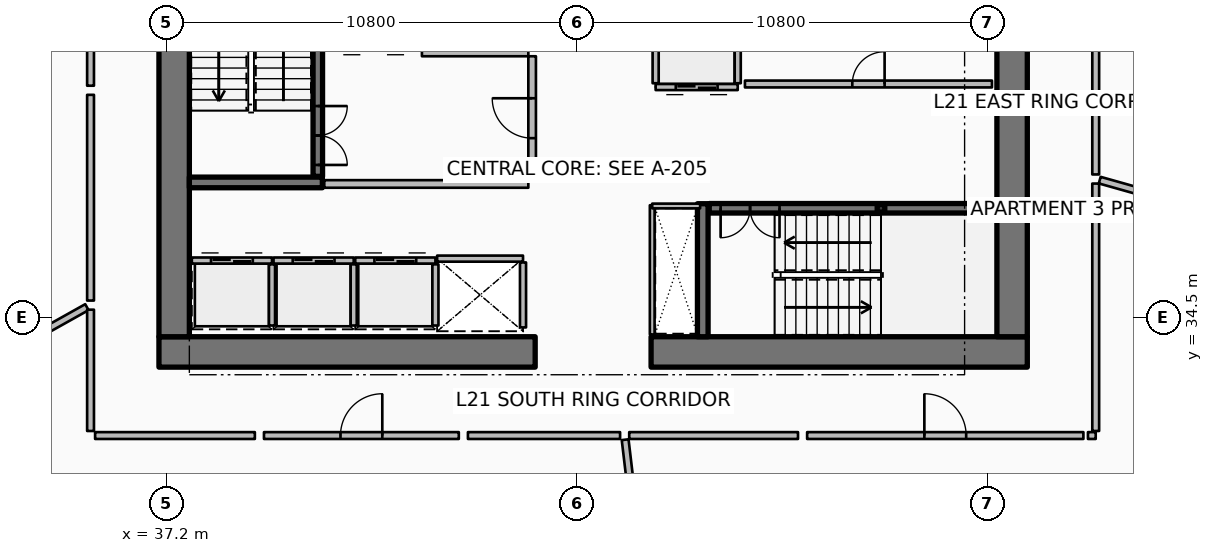
"""IFC4 building model, lengths in metres.
Left out: names, types, materials, properties, quantities, classifications, styles, units other than length and angle.
Written with IfcOpenShell. Run it as: python <this file> out.ifc"""

import sys

from ifc_helpers import new_model, si_unit, direction, frame, frame_2d, origin, origin_2d, place, context, subcontext, project, spatial, rectangle, hollow_rectangle, extrude, element, fill, save


model = new_model("IFC4")
c1 = context("Model", 3, precision=1e-05, world=origin(), true_north=direction((0.0, 1.0)))
c2 = subcontext(c1, "Body", "Model", "MODEL_VIEW")
j1 = project(units=[si_unit("LENGTHUNIT", "METRE"), si_unit("PLANEANGLEUNIT", "RADIAN")], contexts=[c1])
p1 = place(None, origin())
s1 = spatial("IfcSite", under=j1, at=p1, CompositionType="ELEMENT")
p2 = place(p1, origin())
s2 = spatial("IfcBuilding", under=s1, at=p2, CompositionType="ELEMENT")
p3 = place(p2, frame((0.0, 0.0, 86.4)))
s3 = spatial("IfcBuildingStorey", under=s2, at=p3, CompositionType="ELEMENT", Elevation=86.4)
p4 = place(p3, frame((37.0, 33.6, 0.0), z_axis=(0.0, 0.0, 1.0), x_axis=(1.0, 0.0, 0.0)))
e1 = element("IfcWall", 1, at=p4, inside=s3, PredefinedType="SHEAR", context=c2, shape_type="SweptSolid", body=[
    extrude(rectangle(XDim=9.9, YDim=0.8, at=frame_2d((4.95, 0.0))), origin(), (0.0, 0.0, 1.0), 3.75),
])
p5 = place(p3, frame((49.95, 33.6, 0.0), z_axis=(0.0, 0.0, 1.0), x_axis=(1.0, 0.0, 0.0)))
e2 = element("IfcWall", 2, at=p5, inside=s3, PredefinedType="SHEAR", context=c2, shape_type="SweptSolid", body=[
    extrude(rectangle(XDim=9.9, YDim=0.8, at=frame_2d((4.95, 0.0))), origin(), (0.0, 0.0, 1.0), 3.75),
])
for number, where, z_axis, x_axis in (
    (3, (37.4, 34.0, 0.0), (0.0, 0.0, 1.0), (0.0, 1.0, 0.0)),
    (4, (59.45, 34.0, 0.0), (0.0, 0.0, 1.0), (0.0, 1.0, 0.0)),
):
    element("IfcWall", number, at=place(p3, frame(where, z_axis=z_axis, x_axis=x_axis)), inside=s3, PredefinedType="SHEAR", context=c2, shape_type="SweptSolid", body=[
        extrude(rectangle(XDim=16.0, YDim=0.8, at=frame_2d((8.0, 0.0))), origin(), (0.0, 0.0, 1.0), 3.75),
    ])
for number, where, z_axis, x_axis in (
    (5, (37.8, 38.06, 0.0), (0.0, 0.0, 1.0), (1.0, 0.0, 0.0)),
    (6, (51.31, 34.0, 0.0), (0.0, 0.0, 1.0), (0.0, 1.0, 0.0)),
):
    element("IfcWall", number, at=place(p3, frame(where, z_axis=z_axis, x_axis=x_axis)), inside=s3, PredefinedType="SHEAR", context=c2, shape_type="SweptSolid", body=[
        extrude(rectangle(XDim=3.5, YDim=0.28, at=frame_2d((1.75, 0.0))), origin(), (0.0, 0.0, 1.0), 3.75),
    ])
p6 = place(p3, frame((56.0, 37.38, 0.0), z_axis=(0.0, 0.0, 1.0), x_axis=(1.0, 0.0, 0.0)))
e7 = element("IfcColumn", 7, at=p6, inside=s3, PredefinedType="COLUMN", context=c2, shape_type="SweptSolid", body=[
    extrude(hollow_rectangle(XDim=0.2, YDim=0.2, WallThickness=0.01, InnerFilletRadius=0.01, OuterFilletRadius=0.02, at=origin_2d()), origin(), (0.0, 0.0, 1.0), 1.67),
])
p7 = place(p3, frame((41.18, 38.22, 0.0), z_axis=(0.0, 0.0, 1.0), x_axis=(0.0, 1.0, 0.0)))
e8 = element("IfcWall", 8, at=p7, inside=s3, PredefinedType="SOLIDWALL", context=c2, shape_type="SweptSolid", body=[
    extrude(rectangle(XDim=7.56, YDim=0.25, at=frame_2d((3.78, 0.0))), origin(), (0.0, 0.0, 1.0), 3.5),
])
p8 = place(p7, frame((0.3, 0.0, 0.0)))
e9 = element("IfcOpeningElement", 9, at=p8, cuts=e8, PredefinedType="OPENING", context=c2, shape_type="SweptSolid", body=[
    extrude(rectangle(XDim=1.55, YDim=2.15, at=frame_2d((0.775, 1.075))), frame((0.0, 0.135, 0.0), z_axis=(0.0, -1.0, 0.0), x_axis=(1.0, 0.0, 0.0)), (0.0, 0.0, 1.0), 0.27),
])
p9 = place(p3, frame((51.48, 37.38, 0.0), z_axis=(0.0, 0.0, 1.0), x_axis=(1.0, 0.0, 0.0)))
e10 = element("IfcWall", 10, at=p9, inside=s3, PredefinedType="SOLIDWALL", context=c2, shape_type="SweptSolid", body=[
    extrude(rectangle(XDim=7.54, YDim=0.25, at=frame_2d((3.77, 0.0))), origin(), (0.0, 0.0, 1.0), 3.5),
])
p10 = place(p9, frame((0.3, 0.0, 0.0)))
e11 = element("IfcOpeningElement", 11, at=p10, cuts=e10, PredefinedType="OPENING", context=c2, shape_type="SweptSolid", body=[
    extrude(rectangle(XDim=1.55, YDim=2.15, at=frame_2d((0.775, 1.075))), frame((0.0, 0.135, 0.0), z_axis=(0.0, -1.0, 0.0), x_axis=(1.0, 0.0, 0.0)), (0.0, 0.0, 1.0), 0.27),
])
p11 = place(p3, frame((37.865, 36.005, 0.0), z_axis=(0.0, 0.0, 1.0), x_axis=(1.0, 0.0, 0.0)))
e12 = element("IfcWall", 12, at=p11, inside=s3, PredefinedType="PARTITIONING", context=c2, shape_type="SweptSolid", body=[
    extrude(rectangle(XDim=2.11, YDim=0.16, at=frame_2d((1.055, 0.0))), origin(), (0.0, 0.0, 1.0), 3.5),
])
p12 = place(p11, frame((0.505, 0.0, 0.0)))
e13 = element("IfcOpeningElement", 13, at=p12, cuts=e12, PredefinedType="OPENING", context=c2, shape_type="SweptSolid", body=[
    extrude(rectangle(XDim=1.1, YDim=2.1, at=frame_2d((0.55, 1.05))), frame((0.0, 0.09, 0.0), z_axis=(0.0, -1.0, 0.0), x_axis=(1.0, 0.0, 0.0)), (0.0, 0.0, 1.0), 0.18),
])
p13 = place(p3, frame((39.975, 34.295, 0.0), z_axis=(0.0, 0.0, 1.0), x_axis=(0.0, 1.0, 0.0)))
e14 = element("IfcWall", 14, at=p13, inside=s3, PredefinedType="PARTITIONING", context=c2, shape_type="SweptSolid", body=[
    extrude(rectangle(XDim=1.61, YDim=0.16, at=frame_2d((0.805, 0.0))), origin(), (0.0, 0.0, 1.0), 3.5),
])
p14 = place(p3, frame((40.015, 36.005, 0.0), z_axis=(0.0, 0.0, 1.0), x_axis=(1.0, 0.0, 0.0)))
e15 = element("IfcWall", 15, at=p14, inside=s3, PredefinedType="PARTITIONING", context=c2, shape_type="SweptSolid", body=[
    extrude(rectangle(XDim=2.11, YDim=0.16, at=frame_2d((1.055, 0.0))), origin(), (0.0, 0.0, 1.0), 3.5),
])
p15 = place(p14, frame((0.505, 0.0, 0.0)))
e16 = element("IfcOpeningElement", 16, at=p15, cuts=e15, PredefinedType="OPENING", context=c2, shape_type="SweptSolid", body=[
    extrude(rectangle(XDim=1.1, YDim=2.1, at=frame_2d((0.55, 1.05))), frame((0.0, 0.09, 0.0), z_axis=(0.0, -1.0, 0.0), x_axis=(1.0, 0.0, 0.0)), (0.0, 0.0, 1.0), 0.18),
])
p16 = place(p3, frame((42.125, 34.295, 0.0), z_axis=(0.0, 0.0, 1.0), x_axis=(0.0, 1.0, 0.0)))
e17 = element("IfcWall", 17, at=p16, inside=s3, PredefinedType="PARTITIONING", context=c2, shape_type="SweptSolid", body=[
    extrude(rectangle(XDim=1.61, YDim=0.16, at=frame_2d((0.805, 0.0))), origin(), (0.0, 0.0, 1.0), 3.5),
])
p17 = place(p3, frame((42.165, 36.005, 0.0), z_axis=(0.0, 0.0, 1.0), x_axis=(1.0, 0.0, 0.0)))
e18 = element("IfcWall", 18, at=p17, inside=s3, PredefinedType="PARTITIONING", context=c2, shape_type="SweptSolid", body=[
    extrude(rectangle(XDim=2.11, YDim=0.16, at=frame_2d((1.055, 0.0))), origin(), (0.0, 0.0, 1.0), 3.5),
])
p18 = place(p17, frame((0.505, 0.0, 0.0)))
e19 = element("IfcOpeningElement", 19, at=p18, cuts=e18, PredefinedType="OPENING", context=c2, shape_type="SweptSolid", body=[
    extrude(rectangle(XDim=1.1, YDim=2.1, at=frame_2d((0.55, 1.05))), frame((0.0, 0.09, 0.0), z_axis=(0.0, -1.0, 0.0), x_axis=(1.0, 0.0, 0.0)), (0.0, 0.0, 1.0), 0.18),
])
p19 = place(p3, frame((44.275, 34.295, 0.0), z_axis=(0.0, 0.0, 1.0), x_axis=(0.0, 1.0, 0.0)))
e20 = element("IfcWall", 20, at=p19, inside=s3, PredefinedType="PARTITIONING", context=c2, shape_type="SweptSolid", body=[
    extrude(rectangle(XDim=1.61, YDim=0.16, at=frame_2d((0.805, 0.0))), origin(), (0.0, 0.0, 1.0), 3.5),
])
p20 = place(p3, frame((44.32, 36.055, 0.0), z_axis=(0.0, 0.0, 1.0), x_axis=(1.0, 0.0, 0.0)))
e21 = element("IfcWall", 21, at=p20, inside=s3, PredefinedType="PARTITIONING", context=c2, shape_type="SweptSolid", body=[
    extrude(rectangle(XDim=2.26, YDim=0.16, at=frame_2d((1.13, 0.0))), origin(), (0.0, 0.0, 1.0), 3.5),
])
p21 = place(p3, frame((46.58, 34.245, 0.0), z_axis=(0.0, 0.0, 1.0), x_axis=(0.0, 1.0, 0.0)))
e22 = element("IfcWall", 22, at=p21, inside=s3, PredefinedType="PARTITIONING", context=c2, shape_type="SweptSolid", body=[
    extrude(rectangle(XDim=1.71, YDim=0.16, at=frame_2d((0.855, 0.0))), origin(), (0.0, 0.0, 1.0), 3.5),
])
p22 = place(p3, frame((52.23, 40.57, 0.0), z_axis=(0.0, 0.0, 1.0), x_axis=(-1.0, 0.0, 0.0)))
e23 = element("IfcWall", 23, at=p22, inside=s3, PredefinedType="PARTITIONING", context=c2, shape_type="SweptSolid", body=[
    extrude(rectangle(XDim=2.16, YDim=0.16, at=frame_2d((1.08, 0.0))), origin(), (0.0, 0.0, 1.0), 3.5),
])
p23 = place(p22, frame((0.53, 0.0, 0.0)))
e24 = element("IfcOpeningElement", 24, at=p23, cuts=e23, PredefinedType="OPENING", context=c2, shape_type="SweptSolid", body=[
    extrude(rectangle(XDim=1.1, YDim=2.1, at=frame_2d((0.55, 1.05))), frame((0.0, 0.09, 0.0), z_axis=(0.0, -1.0, 0.0), x_axis=(1.0, 0.0, 0.0)), (0.0, 0.0, 1.0), 0.18),
])
for number, where, z_axis, x_axis in (
    (25, (52.23, 40.67, 0.0), (0.0, 0.0, 1.0), (0.0, 1.0, 0.0)),
    (26, (50.07, 40.67, 0.0), (0.0, 0.0, 1.0), (0.0, 1.0, 0.0)),
):
    element("IfcWall", number, at=place(p3, frame(where, z_axis=z_axis, x_axis=x_axis)), inside=s3, PredefinedType="PARTITIONING", context=c2, shape_type="SweptSolid", body=[
        extrude(rectangle(XDim=2.16, YDim=0.16, at=frame_2d((1.08, 0.0))), origin(), (0.0, 0.0, 1.0), 3.5),
    ])
p24 = place(p3, frame((52.42, 40.65, 0.0), z_axis=(0.0, 0.0, 1.0), x_axis=(1.0, 0.0, 0.0)))
e27 = element("IfcWall", 27, at=p24, inside=s3, PredefinedType="PARTITIONING", context=c2, shape_type="SweptSolid", body=[
    extrude(rectangle(XDim=6.5, YDim=0.18, at=frame_2d((3.25, 0.0))), origin(), (0.0, 0.0, 1.0), 3.5),
])
p25 = place(p24, frame((2.825, 0.0, 0.0)))
e28 = element("IfcOpeningElement", 28, at=p25, cuts=e27, PredefinedType="OPENING", context=c2, shape_type="SweptSolid", body=[
    extrude(rectangle(XDim=0.85, YDim=2.06, at=frame_2d((0.425, 1.03))), frame((0.0, 0.1, 0.0), z_axis=(0.0, -1.0, 0.0), x_axis=(1.0, 0.0, 0.0)), (0.0, 0.0, 1.0), 0.2),
])
p26 = place(p3, frame((41.35, 38.02, 0.0), z_axis=(0.0, 0.0, 1.0), x_axis=(1.0, 0.0, 0.0)))
e29 = element("IfcWall", 29, at=p26, inside=s3, PredefinedType="PARTITIONING", context=c2, shape_type="SweptSolid", body=[
    extrude(rectangle(XDim=5.37, YDim=0.2, at=frame_2d((2.685, 0.0))), origin(), (0.0, 0.0, 1.0), 3.5),
])
p27 = place(p3, frame((43.92, 41.48, 0.0), z_axis=(0.0, 0.0, 1.0), x_axis=(1.0, 0.0, 0.0)))
e30 = element("IfcWall", 30, at=p27, inside=s3, PredefinedType="PARTITIONING", context=c2, shape_type="SweptSolid", body=[
    extrude(rectangle(XDim=2.8, YDim=0.2, at=frame_2d((1.4, 0.0))), origin(), (0.0, 0.0, 1.0), 3.5),
])
p28 = place(p3, frame((46.82, 38.12, 0.0), z_axis=(0.0, 0.0, 1.0), x_axis=(0.0, 1.0, 0.0)))
e31 = element("IfcWall", 31, at=p28, inside=s3, PredefinedType="PARTITIONING", context=c2, shape_type="SweptSolid", body=[
    extrude(rectangle(XDim=3.26, YDim=0.2, at=frame_2d((1.63, 0.0))), origin(), (0.0, 0.0, 1.0), 3.5),
])
p29 = place(p28, frame((1.105, 0.0, 0.0)))
e32 = element("IfcOpeningElement", 32, at=p29, cuts=e31, PredefinedType="OPENING", context=c2, shape_type="SweptSolid", body=[
    extrude(rectangle(XDim=1.05, YDim=2.1, at=frame_2d((0.525, 1.05))), frame((0.0, 0.11, 0.0), z_axis=(0.0, -1.0, 0.0), x_axis=(1.0, 0.0, 0.0)), (0.0, 0.0, 1.0), 0.22),
])
p30 = place(p3, frame((49.98, 34.06, 0.0), z_axis=(0.0, 0.0, 1.0), x_axis=(0.0, 1.0, 0.0)))
e33 = element("IfcWall", 33, at=p30, inside=s3, PredefinedType="PARTITIONING", context=c2, shape_type="SweptSolid", body=[
    extrude(rectangle(XDim=3.4, YDim=0.125, at=frame_2d((1.7, 0.0))), origin(), (0.0, 0.0, 1.0), 2.94),
])
p31 = place(p3, frame((49.98, 37.44, 0.0), z_axis=(0.0, 0.0, 1.0), x_axis=(1.0, 0.0, 0.0)))
e34 = element("IfcWall", 34, at=p31, inside=s3, PredefinedType="PARTITIONING", context=c2, shape_type="SweptSolid", body=[
    extrude(rectangle(XDim=1.26, YDim=0.125, at=frame_2d((0.63, 0.0))), origin(), (0.0, 0.0, 1.0), 2.94),
])
p32 = place(p3, frame((35.104, 34.778, 0.0), z_axis=(0.0, 0.0, 1.0), x_axis=(-0.872490437896, -0.488631185845, 0.0)))
e35 = element("IfcWall", 35, at=p32, inside=s3, PredefinedType="PARTITIONING", context=c2, shape_type="SweptSolid", body=[
    extrude(rectangle(XDim=14.699, YDim=0.18, at=frame_2d((7.35, 0.0))), origin(), (0.0, 0.0, 1.0), 2.94),
])
p33 = place(p3, frame((49.268, 31.291, 0.0), z_axis=(0.0, 0.0, 1.0), x_axis=(0.117532311618, -0.993069058891, 0.0)))
e36 = element("IfcWall", 36, at=p33, inside=s3, PredefinedType="PARTITIONING", context=c2, shape_type="SweptSolid", body=[
    extrude(rectangle(XDim=13.138, YDim=0.18, at=frame_2d((6.569, 0.0))), origin(), (0.0, 0.0, 1.0), 2.94),
])
p34 = place(p3, frame((61.756, 38.12, 0.0), z_axis=(0.0, 0.0, 1.0), x_axis=(0.962455861176, -0.271438234756, 0.0)))
e37 = element("IfcWall", 37, at=p34, inside=s3, PredefinedType="PARTITIONING", context=c2, shape_type="SweptSolid", body=[
    extrude(rectangle(XDim=14.279, YDim=0.18, at=frame_2d((7.139, 0.0))), origin(), (0.0, 0.0, 1.0), 2.94),
])
p35 = place(p3, frame((35.2, 45.49, 0.0), z_axis=(0.0, 0.0, 1.0), x_axis=(0.0, -1.0, 0.0)))
e38 = element("IfcWall", 38, at=p35, inside=s3, PredefinedType="PARTITIONING", context=c2, shape_type="SweptSolid", body=[
    extrude(rectangle(XDim=4.885, YDim=0.18, at=frame_2d((2.442, 0.0))), origin(), (0.0, 0.0, 1.0), 2.94),
])
p36 = place(p3, frame((35.2, 40.365, 0.0), z_axis=(0.0, 0.0, 1.0), x_axis=(0.0, -1.0, 0.0)))
e39 = element("IfcWall", 39, at=p36, inside=s3, PredefinedType="PARTITIONING", context=c2, shape_type="SweptSolid", body=[
    extrude(rectangle(XDim=5.413, YDim=0.18, at=frame_2d((2.707, 0.0))), origin(), (0.0, 0.0, 1.0), 2.94),
])
p37 = place(p3, frame((39.764, 31.4, 0.0), z_axis=(0.0, 0.0, 1.0), x_axis=(1.0, 0.0, 0.0)))
e40 = element("IfcWall", 40, at=p37, inside=s3, PredefinedType="PARTITIONING", context=c2, shape_type="SweptSolid", body=[
    extrude(rectangle(XDim=5.127, YDim=0.18, at=frame_2d((2.563, 0.0))), origin(), (0.0, 0.0, 1.0), 2.94),
])
p38 = place(p37, frame((2.013, 0.0, 0.0)))
e41 = element("IfcOpeningElement", 41, at=p38, cuts=e40, PredefinedType="OPENING", context=c2, shape_type="SweptSolid", body=[
    extrude(rectangle(XDim=1.1, YDim=2.1, at=frame_2d((0.55, 1.05))), frame((0.0, 0.1, 0.0), z_axis=(0.0, -1.0, 0.0), x_axis=(1.0, 0.0, 0.0)), (0.0, 0.0, 1.0), 0.2),
])
p39 = place(p3, frame((35.2, 34.712, 0.0), z_axis=(0.0, 0.0, 1.0), x_axis=(0.0, -1.0, 0.0)))
e42 = element("IfcWall", 42, at=p39, inside=s3, PredefinedType="PARTITIONING", context=c2, shape_type="SweptSolid", body=[
    extrude(rectangle(XDim=3.192, YDim=0.18, at=frame_2d((1.596, 0.0))), origin(), (0.0, 0.0, 1.0), 2.94),
])
p40 = place(p3, frame((35.32, 31.4, 0.0), z_axis=(0.0, 0.0, 1.0), x_axis=(1.0, 0.0, 0.0)))
e43 = element("IfcWall", 43, at=p40, inside=s3, PredefinedType="PARTITIONING", context=c2, shape_type="SweptSolid", body=[
    extrude(rectangle(XDim=4.204, YDim=0.18, at=frame_2d((2.102, 0.0))), origin(), (0.0, 0.0, 1.0), 2.94),
])
p41 = place(p3, frame((33.092, 30.74, 0.0), z_axis=(0.0, 0.0, 1.0), x_axis=(0.653244508484, -0.757147021479, 0.0)))
e44 = element("IfcWall", 44, at=p41, inside=s3, PredefinedType="PARTITIONING", context=c2, shape_type="SweptSolid", body=[
    extrude(rectangle(XDim=2.439, YDim=0.125, at=frame_2d((1.219, 0.0))), origin(), (0.0, 0.0, 1.0), 2.94),
])
p42 = place(p41, frame((0.794, 0.0, 0.0)))
e45 = element("IfcOpeningElement", 45, at=p42, cuts=e44, PredefinedType="OPENING", context=c2, shape_type="SweptSolid", body=[
    extrude(rectangle(XDim=0.85, YDim=2.06, at=frame_2d((0.425, 1.03))), frame((0.0, 0.073, 0.0), z_axis=(0.0, -1.0, 0.0), x_axis=(1.0, 0.0, 0.0)), (0.0, 0.0, 1.0), 0.145),
])
p43 = place(p3, frame((45.131, 31.4, 0.0), z_axis=(0.0, 0.0, 1.0), x_axis=(1.0, 0.0, 0.0)))
e46 = element("IfcWall", 46, at=p43, inside=s3, PredefinedType="PARTITIONING", context=c2, shape_type="SweptSolid", body=[
    extrude(rectangle(XDim=4.004, YDim=0.18, at=frame_2d((2.002, 0.0))), origin(), (0.0, 0.0, 1.0), 2.94),
])
p44 = place(p3, frame((54.056, 31.4, 0.0), z_axis=(0.0, 0.0, 1.0), x_axis=(1.0, 0.0, 0.0)))
e47 = element("IfcWall", 47, at=p44, inside=s3, PredefinedType="PARTITIONING", context=c2, shape_type="SweptSolid", body=[
    extrude(rectangle(XDim=7.27, YDim=0.18, at=frame_2d((3.635, 0.0))), origin(), (0.0, 0.0, 1.0), 2.94),
])
p45 = place(p44, frame((3.085, 0.0, 0.0)))
e48 = element("IfcOpeningElement", 48, at=p45, cuts=e47, PredefinedType="OPENING", context=c2, shape_type="SweptSolid", body=[
    extrude(rectangle(XDim=1.1, YDim=2.1, at=frame_2d((0.55, 1.05))), frame((0.0, 0.1, 0.0), z_axis=(0.0, -1.0, 0.0), x_axis=(1.0, 0.0, 0.0)), (0.0, 0.0, 1.0), 0.2),
])
p46 = place(p3, frame((49.375, 31.4, 0.0), z_axis=(0.0, 0.0, 1.0), x_axis=(1.0, 0.0, 0.0)))
e49 = element("IfcWall", 49, at=p46, inside=s3, PredefinedType="PARTITIONING", context=c2, shape_type="SweptSolid", body=[
    extrude(rectangle(XDim=4.442, YDim=0.18, at=frame_2d((2.221, 0.0))), origin(), (0.0, 0.0, 1.0), 2.94),
])
p47 = place(p3, frame((61.446, 31.4, 0.0), z_axis=(0.0, 0.0, 1.0), x_axis=(1.0, 0.0, 0.0)))
e50 = element("IfcWall", 50, at=p47, inside=s3, PredefinedType="PARTITIONING", context=c2, shape_type="SweptSolid", body=[
    extrude(rectangle(XDim=0.204, YDim=0.18, at=frame_2d((0.102, 0.0))), origin(), (0.0, 0.0, 1.0), 2.94),
])
p48 = place(p3, frame((61.65, 31.52, 0.0), z_axis=(0.0, 0.0, 1.0), x_axis=(0.0, 1.0, 0.0)))
e51 = element("IfcWall", 51, at=p48, inside=s3, PredefinedType="PARTITIONING", context=c2, shape_type="SweptSolid", body=[
    extrude(rectangle(XDim=6.51, YDim=0.18, at=frame_2d((3.255, 0.0))), origin(), (0.0, 0.0, 1.0), 2.94),
])
p49 = place(p3, frame((61.65, 38.27, 0.0), z_axis=(0.0, 0.0, 1.0), x_axis=(0.0, 1.0, 0.0)))
e52 = element("IfcWall", 52, at=p49, inside=s3, PredefinedType="PARTITIONING", context=c2, shape_type="SweptSolid", body=[
    extrude(rectangle(XDim=5.225, YDim=0.18, at=frame_2d((2.613, 0.0))), origin(), (0.0, 0.0, 1.0), 2.94),
])
p50 = place(p8, origin())
e53 = element("IfcDoor", 53, at=p50, inside=s3, OperationType="DOUBLE_DOOR_SINGLE_SWING", PredefinedType="DOOR", context=c2, shape_type="SweptSolid", body=[
    extrude(rectangle(XDim=1.55, YDim=2.15, at=frame_2d((0.775, 1.075))), frame((0.0, 0.025, 0.0), z_axis=(0.0, -1.0, 0.0), x_axis=(1.0, 0.0, 0.0)), (0.0, 0.0, 1.0), 0.05),
])
fill(e9, e53)
p51 = place(p10, origin())
e54 = element("IfcDoor", 54, at=p51, inside=s3, OperationType="DOUBLE_DOOR_SINGLE_SWING", PredefinedType="DOOR", context=c2, shape_type="SweptSolid", body=[
    extrude(rectangle(XDim=1.55, YDim=2.15, at=frame_2d((0.775, 1.075))), frame((0.0, 0.025, 0.0), z_axis=(0.0, -1.0, 0.0), x_axis=(1.0, 0.0, 0.0)), (0.0, 0.0, 1.0), 0.05),
])
fill(e11, e54)
p52 = place(p12, origin())
e55 = element("IfcDoor", 55, at=p52, inside=s3, OperationType="DOUBLE_DOOR_SLIDING", PredefinedType="DOOR", context=c2, shape_type="SweptSolid", body=[
    extrude(rectangle(XDim=1.1, YDim=2.1, at=frame_2d((0.55, 1.05))), frame((0.0, 0.025, 0.0), z_axis=(0.0, -1.0, 0.0), x_axis=(1.0, 0.0, 0.0)), (0.0, 0.0, 1.0), 0.05),
])
fill(e13, e55)
p53 = place(p15, origin())
e56 = element("IfcDoor", 56, at=p53, inside=s3, OperationType="DOUBLE_DOOR_SLIDING", PredefinedType="DOOR", context=c2, shape_type="SweptSolid", body=[
    extrude(rectangle(XDim=1.1, YDim=2.1, at=frame_2d((0.55, 1.05))), frame((0.0, 0.025, 0.0), z_axis=(0.0, -1.0, 0.0), x_axis=(1.0, 0.0, 0.0)), (0.0, 0.0, 1.0), 0.05),
])
fill(e16, e56)
p54 = place(p18, origin())
e57 = element("IfcDoor", 57, at=p54, inside=s3, OperationType="DOUBLE_DOOR_SLIDING", PredefinedType="DOOR", context=c2, shape_type="SweptSolid", body=[
    extrude(rectangle(XDim=1.1, YDim=2.1, at=frame_2d((0.55, 1.05))), frame((0.0, 0.025, 0.0), z_axis=(0.0, -1.0, 0.0), x_axis=(1.0, 0.0, 0.0)), (0.0, 0.0, 1.0), 0.05),
])
fill(e19, e57)
p55 = place(p23, origin())
e58 = element("IfcDoor", 58, at=p55, inside=s3, OperationType="DOUBLE_DOOR_SLIDING", PredefinedType="DOOR", context=c2, shape_type="SweptSolid", body=[
    extrude(rectangle(XDim=1.1, YDim=2.1, at=frame_2d((0.55, 1.05))), frame((0.0, 0.025, 0.0), z_axis=(0.0, -1.0, 0.0), x_axis=(1.0, 0.0, 0.0)), (0.0, 0.0, 1.0), 0.05),
])
fill(e24, e58)
p56 = place(p25, origin())
e59 = element("IfcDoor", 59, at=p56, inside=s3, OperationType="SINGLE_SWING_RIGHT", PredefinedType="DOOR", context=c2, shape_type="SweptSolid", body=[
    extrude(rectangle(XDim=0.85, YDim=2.06, at=frame_2d((0.425, 1.03))), frame((0.0, 0.025, 0.0), z_axis=(0.0, -1.0, 0.0), x_axis=(1.0, 0.0, 0.0)), (0.0, 0.0, 1.0), 0.05),
])
fill(e28, e59)
p57 = place(p29, origin())
e60 = element("IfcDoor", 60, at=p57, inside=s3, OperationType="SINGLE_SWING_RIGHT", PredefinedType="DOOR", context=c2, shape_type="SweptSolid", body=[
    extrude(rectangle(XDim=1.05, YDim=2.1, at=frame_2d((0.525, 1.05))), frame((0.0, 0.025, 0.0), z_axis=(0.0, -1.0, 0.0), x_axis=(1.0, 0.0, 0.0)), (0.0, 0.0, 1.0), 0.05),
])
fill(e32, e60)
p58 = place(p38, origin())
e61 = element("IfcDoor", 61, at=p58, inside=s3, OperationType="SINGLE_SWING_RIGHT", PredefinedType="DOOR", context=c2, shape_type="SweptSolid", body=[
    extrude(rectangle(XDim=1.1, YDim=2.1, at=frame_2d((0.55, 1.05))), frame((0.0, 0.025, 0.0), z_axis=(0.0, -1.0, 0.0), x_axis=(1.0, 0.0, 0.0)), (0.0, 0.0, 1.0), 0.05),
])
fill(e41, e61)
p59 = place(p45, origin())
e62 = element("IfcDoor", 62, at=p59, inside=s3, OperationType="SINGLE_SWING_LEFT", PredefinedType="DOOR", context=c2, shape_type="SweptSolid", body=[
    extrude(rectangle(XDim=1.1, YDim=2.1, at=frame_2d((0.55, 1.05))), frame((0.0, 0.025, 0.0), z_axis=(0.0, -1.0, 0.0), x_axis=(1.0, 0.0, 0.0)), (0.0, 0.0, 1.0), 0.05),
])
fill(e48, e62)
save(model, sys.argv[1])
